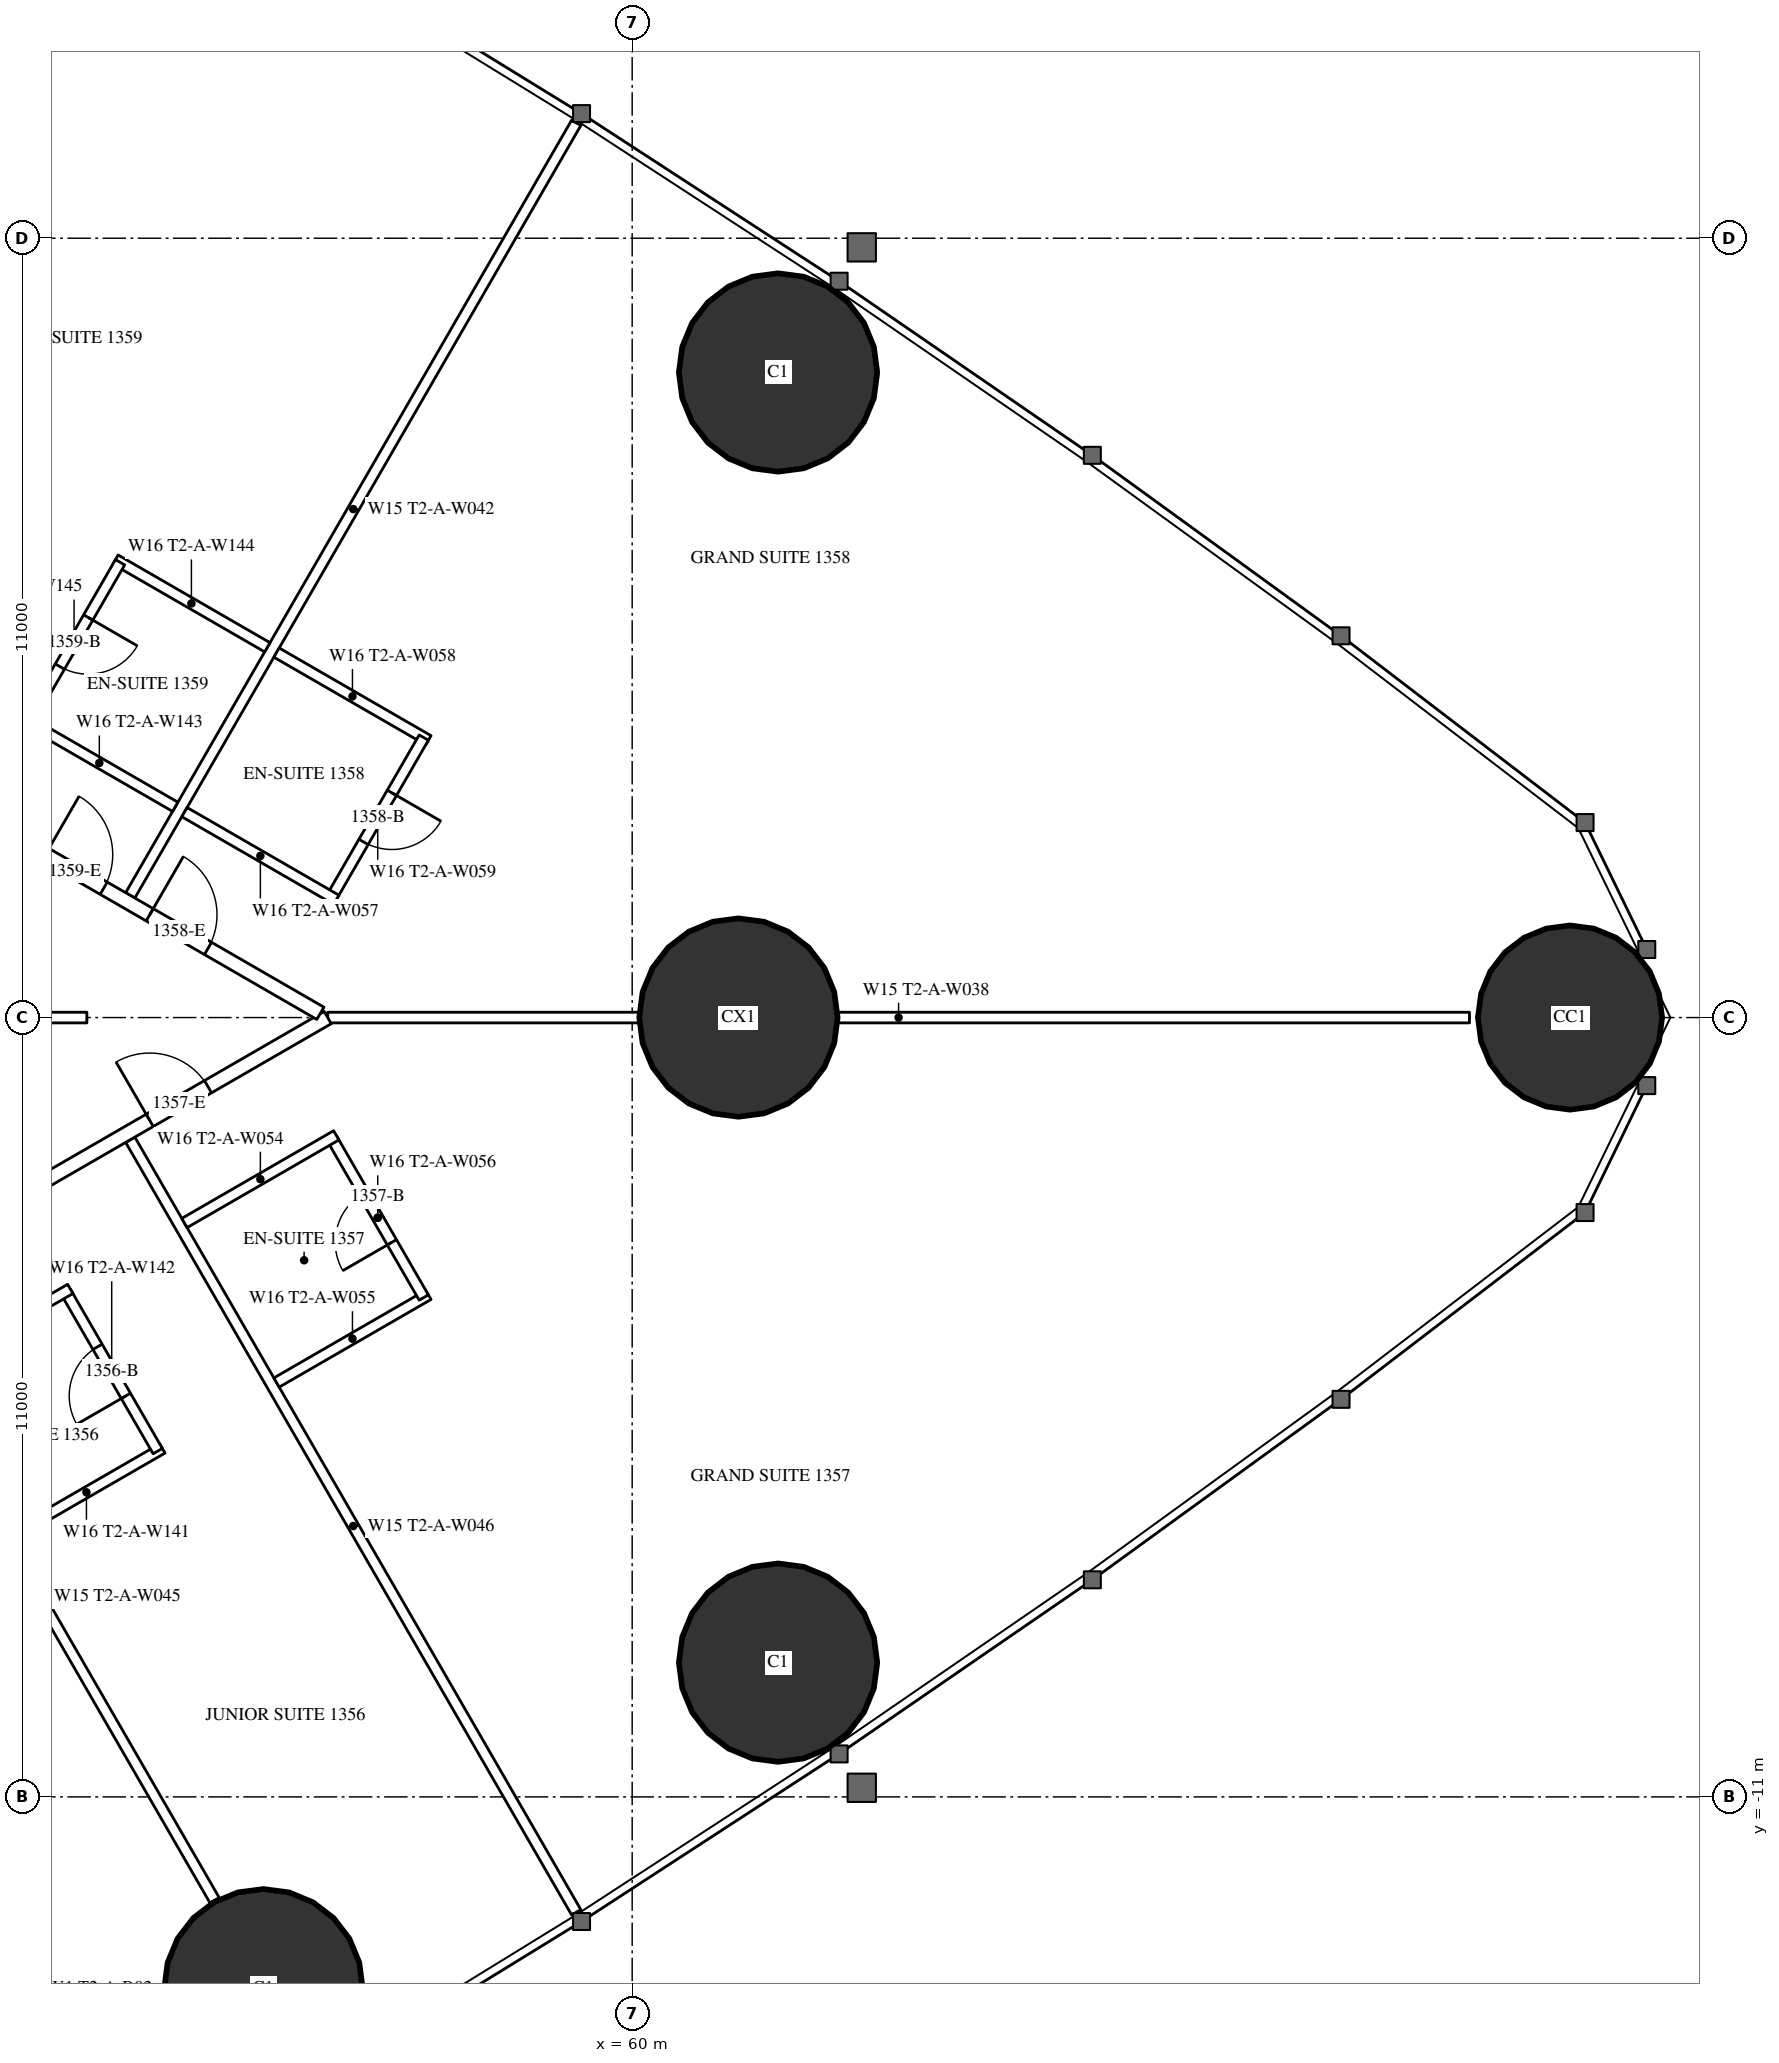
"""IFC4 building model, lengths in metres.
Left out: names, types, materials, properties, quantities, classifications, styles, units other than length and angle.
Written with IfcOpenShell. Run it as: python <this file> out.ifc"""

import sys

from ifc_helpers import new_model, si_unit, direction, frame, frame_2d, origin, origin_2d, place, context, subcontext, project, spatial, rectangle, hollow_circle, extrude, element, fill, save


model = new_model("IFC4")
c1 = context("Model", 3, precision=1e-05, world=origin(), true_north=direction((0.0, 1.0)))
c2 = subcontext(c1, "Body", "Model", "MODEL_VIEW")
j1 = project(units=[si_unit("LENGTHUNIT", "METRE"), si_unit("PLANEANGLEUNIT", "RADIAN")], contexts=[c1])
p1 = place(None, origin())
s1 = spatial("IfcSite", under=j1, at=p1, CompositionType="ELEMENT")
p2 = place(p1, origin())
s2 = spatial("IfcBuilding", under=s1, at=p2, CompositionType="ELEMENT")
p3 = place(p2, frame((0.0, 0.0, 53.0)))
s3 = spatial("IfcBuildingStorey", under=s2, at=p3, CompositionType="ELEMENT", Elevation=53.0)
p4 = place(p3, frame((73.239, 0.0, 0.0), z_axis=(0.0, 0.0, 1.0), x_axis=(1.0, 0.0, 0.0)))
e1 = element("IfcColumn", 1, at=p4, inside=s3, PredefinedType="COLUMN", context=c2, shape_type="SweptSolid", body=[
    extrude(hollow_circle(Radius=1.3, WallThickness=0.1, at=origin_2d()), origin(), (0.0, 0.0, 1.0), 3.5),
])
for number, where, z_axis, x_axis in (
    (2, (62.059, 9.105, 0.0), (0.0, 0.0, 1.0), (1.0, 0.0, 0.0)),
    (3, (54.795, -13.701, 0.0), (0.0, 0.0, 1.0), (1.0, 0.0, 0.0)),
    (4, (62.059, -9.105, 0.0), (0.0, 0.0, 1.0), (1.0, 0.0, 0.0)),
):
    element("IfcColumn", number, at=place(p3, frame(where, z_axis=z_axis, x_axis=x_axis)), inside=s3, PredefinedType="COLUMN", context=c2, shape_type="SweptSolid", body=[
        extrude(hollow_circle(Radius=1.4, WallThickness=0.12, at=origin_2d()), origin(), (0.0, 0.0, 1.0), 3.5),
    ])
p5 = place(p3, frame((61.5, 0.0, 0.0), z_axis=(0.0, 0.0, 1.0), x_axis=(1.0, 0.0, 0.0)))
e5 = element("IfcColumn", 5, at=p5, inside=s3, PredefinedType="COLUMN", context=c2, shape_type="SweptSolid", body=[
    extrude(hollow_circle(Radius=1.4, WallThickness=0.1, at=origin_2d()), origin(), (0.0, 0.0, 1.0), 3.5),
])
p6 = place(p3, frame((45.403, -6.062, 0.0), z_axis=(0.0, 0.0, 1.0), x_axis=(0.500007077968, -0.866021317279, 0.0)))
e6 = element("IfcWall", 6, at=p6, inside=s3, PredefinedType="PARTITIONING", context=c2, shape_type="SweptSolid", body=[
    extrude(rectangle(XDim=12.721, YDim=0.15, at=frame_2d((6.361, 0.0))), origin(), (0.0, 0.0, 1.0), 3.25),
])
p7 = place(p3, frame((49.159, -3.893, 0.0), z_axis=(0.0, 0.0, 1.0), x_axis=(0.499998773722, -0.866026111775, 0.0)))
e7 = element("IfcWall", 7, at=p7, inside=s3, PredefinedType="PARTITIONING", context=c2, shape_type="SweptSolid", body=[
    extrude(rectangle(XDim=9.892, YDim=0.15, at=frame_2d((4.946, 0.0))), origin(), (0.0, 0.0, 1.0), 2.25),
])
for number, where, z_axis, x_axis in (
    (8, (52.915, -1.725, 0.0), (0.0, 0.0, 1.0), (0.5, -0.866, 0.0)),
    (9, (52.915, 1.725, 0.0), (0.0, 0.0, 1.0), (0.5, 0.866, 0.0)),
):
    element("IfcWall", number, at=place(p3, frame(where, z_axis=z_axis, x_axis=x_axis)), inside=s3, PredefinedType="PARTITIONING", context=c2, shape_type="SweptSolid", body=[
        extrude(rectangle(XDim=12.591, YDim=0.15, at=frame_2d((6.295, 0.0))), origin(), (0.0, 0.0, 1.0), 3.25),
    ])
p8 = place(p3, frame((55.702, 0.0, 0.0), z_axis=(0.0, 0.0, 1.0), x_axis=(1.0, 0.0, 0.0)))
e10 = element("IfcWall", 10, at=p8, inside=s3, PredefinedType="PARTITIONING", context=c2, shape_type="SweptSolid", body=[
    extrude(rectangle(XDim=16.117, YDim=0.15, at=frame_2d((8.059, 0.0))), origin(), (0.0, 0.0, 1.0), 2.25),
])
p9 = place(p3, frame((37.96, -10.243, 0.0), z_axis=(0.0, 0.0, 1.0), x_axis=(0.866026429433, 0.499998223521, 0.0)))
e11 = element("IfcWall", 11, at=p9, inside=s3, PredefinedType="PARTITIONING", context=c2, shape_type="SweptSolid", body=[
    extrude(rectangle(XDim=20.487, YDim=0.2, at=frame_2d((10.243, 0.0))), origin(), (0.0, 0.0, 1.0), 3.25),
])
p10 = place(p9, frame((6.925, 0.0, 0.0)))
e12 = element("IfcOpeningElement", 12, at=p10, cuts=e11, PredefinedType="OPENING", context=c2, shape_type="SweptSolid", body=[
    extrude(rectangle(XDim=0.95, YDim=2.2, at=frame_2d((0.475, 1.1))), frame((0.0, 0.11, 0.0), z_axis=(0.0, -1.0, 0.0), x_axis=(1.0, 0.0, 0.0)), (0.0, 0.0, 1.0), 0.22),
])
p11 = place(p9, frame((11.549, 0.0, 0.0)))
e13 = element("IfcOpeningElement", 13, at=p11, cuts=e11, PredefinedType="OPENING", context=c2, shape_type="SweptSolid", body=[
    extrude(rectangle(XDim=0.95, YDim=2.2, at=frame_2d((0.475, 1.1))), frame((0.0, 0.11, 0.0), z_axis=(0.0, -1.0, 0.0), x_axis=(1.0, 0.0, 0.0)), (0.0, 0.0, 1.0), 0.22),
])
p12 = place(p9, frame((13.249, 0.0, 0.0)))
e14 = element("IfcOpeningElement", 14, at=p12, cuts=e11, PredefinedType="OPENING", context=c2, shape_type="SweptSolid", body=[
    extrude(rectangle(XDim=0.95, YDim=2.2, at=frame_2d((0.475, 1.1))), frame((0.0, 0.11, 0.0), z_axis=(0.0, -1.0, 0.0), x_axis=(1.0, 0.0, 0.0)), (0.0, 0.0, 1.0), 0.22),
])
p13 = place(p9, frame((17.585, 0.0, 0.0)))
e15 = element("IfcOpeningElement", 15, at=p13, cuts=e11, PredefinedType="OPENING", context=c2, shape_type="SweptSolid", body=[
    extrude(rectangle(XDim=0.95, YDim=2.2, at=frame_2d((0.475, 1.1))), frame((0.0, 0.11, 0.0), z_axis=(0.0, -1.0, 0.0), x_axis=(1.0, 0.0, 0.0)), (0.0, 0.0, 1.0), 0.22),
])
p14 = place(p9, frame((0.6, 0.0, 0.0)))
e16 = element("IfcOpeningElement", 16, at=p14, cuts=e11, PredefinedType="OPENING", context=c2, shape_type="SweptSolid", body=[
    extrude(rectangle(XDim=0.95, YDim=2.2, at=frame_2d((0.475, 1.1))), frame((0.0, 0.11, 0.0), z_axis=(0.0, -1.0, 0.0), x_axis=(1.0, 0.0, 0.0)), (0.0, 0.0, 1.0), 0.22),
])
p15 = place(p3, frame((45.375, 5.963, 0.0), z_axis=(0.0, 0.0, 1.0), x_axis=(0.86603164725, -0.499989185844, 0.0)))
e17 = element("IfcWall", 17, at=p15, inside=s3, PredefinedType="PARTITIONING", context=c2, shape_type="SweptSolid", body=[
    extrude(rectangle(XDim=11.805, YDim=0.2, at=frame_2d((5.903, 0.0))), origin(), (0.0, 0.0, 1.0), 3.25),
])
p16 = place(p15, frame((9.024, 0.0, 0.0)))
e18 = element("IfcOpeningElement", 18, at=p16, cuts=e17, PredefinedType="OPENING", context=c2, shape_type="SweptSolid", body=[
    extrude(rectangle(XDim=0.95, YDim=2.2, at=frame_2d((0.475, 1.1))), frame((0.0, 0.11, 0.0), z_axis=(0.0, -1.0, 0.0), x_axis=(1.0, 0.0, 0.0)), (0.0, 0.0, 1.0), 0.22),
])
p17 = place(p15, frame((7.324, 0.0, 0.0)))
e19 = element("IfcOpeningElement", 19, at=p17, cuts=e17, PredefinedType="OPENING", context=c2, shape_type="SweptSolid", body=[
    extrude(rectangle(XDim=0.95, YDim=2.2, at=frame_2d((0.475, 1.1))), frame((0.0, 0.11, 0.0), z_axis=(0.0, -1.0, 0.0), x_axis=(1.0, 0.0, 0.0)), (0.0, 0.0, 1.0), 0.22),
])
p18 = place(p3, frame((51.224, -7.32, 0.0), z_axis=(0.0, 0.0, 1.0), x_axis=(0.866031185235, 0.4999899861, 0.0)))
e20 = element("IfcWall", 20, at=p18, inside=s3, PredefinedType="PARTITIONING", context=c2, shape_type="SweptSolid", body=[
    extrude(rectangle(XDim=2.475, YDim=0.15, at=frame_2d((1.238, 0.0))), origin(), (0.0, 0.0, 1.0), 3.25),
])
p19 = place(p3, frame((52.003, -3.868, 0.0), z_axis=(0.0, 0.0, 1.0), x_axis=(0.500047596559, -0.865997922154, 0.0)))
e21 = element("IfcWall", 21, at=p19, inside=s3, PredefinedType="PARTITIONING", context=c2, shape_type="SweptSolid", body=[
    extrude(rectangle(XDim=2.6, YDim=0.15, at=frame_2d((1.3, 0.0))), origin(), (0.0, 0.0, 1.0), 3.25),
])
p20 = place(p19, frame((0.9, 0.0, 0.0)))
e22 = element("IfcOpeningElement", 22, at=p20, cuts=e21, PredefinedType="OPENING", context=c2, shape_type="SweptSolid", body=[
    extrude(rectangle(XDim=0.8, YDim=2.2, at=frame_2d((0.4, 1.1))), frame((0.0, 0.085, 0.0), z_axis=(0.0, -1.0, 0.0), x_axis=(1.0, 0.0, 0.0)), (0.0, 0.0, 1.0), 0.17),
])
for number, where, z_axis, x_axis in (
    (23, (49.925, -5.068, 0.0), (0.0, 0.0, 1.0), (0.866, 0.5, 0.0)),
    (24, (54.98, -5.151, 0.0), (0.0, 0.0, 1.0), (0.866, 0.5, 0.0)),
):
    element("IfcWall", number, at=place(p3, frame(where, z_axis=z_axis, x_axis=x_axis)), inside=s3, PredefinedType="PARTITIONING", context=c2, shape_type="SweptSolid", body=[
        extrude(rectangle(XDim=2.475, YDim=0.15, at=frame_2d((1.237, 0.0))), origin(), (0.0, 0.0, 1.0), 3.25),
    ])
p21 = place(p3, frame((55.758, -1.7, 0.0), z_axis=(0.0, 0.0, 1.0), x_axis=(0.500006934395, -0.866021400173, 0.0)))
e25 = element("IfcWall", 25, at=p21, inside=s3, PredefinedType="PARTITIONING", context=c2, shape_type="SweptSolid", body=[
    extrude(rectangle(XDim=2.6, YDim=0.15, at=frame_2d((1.3, 0.0))), origin(), (0.0, 0.0, 1.0), 3.25),
])
p22 = place(p21, frame((0.9, 0.0, 0.0)))
e26 = element("IfcOpeningElement", 26, at=p22, cuts=e25, PredefinedType="OPENING", context=c2, shape_type="SweptSolid", body=[
    extrude(rectangle(XDim=0.8, YDim=2.2, at=frame_2d((0.4, 1.1))), frame((0.0, 0.085, 0.0), z_axis=(0.0, -1.0, 0.0), x_axis=(1.0, 0.0, 0.0)), (0.0, 0.0, 1.0), 0.17),
])
for number, where, z_axis, x_axis in (
    (27, (53.68, -2.9, 0.0), (0.0, 0.0, 1.0), (0.866, 0.5, 0.0)),
    (28, (54.98, 5.151, 0.0), (0.0, 0.0, 1.0), (0.866, -0.5, 0.0)),
):
    element("IfcWall", number, at=place(p3, frame(where, z_axis=z_axis, x_axis=x_axis)), inside=s3, PredefinedType="PARTITIONING", context=c2, shape_type="SweptSolid", body=[
        extrude(rectangle(XDim=2.475, YDim=0.15, at=frame_2d((1.237, 0.0))), origin(), (0.0, 0.0, 1.0), 3.25),
    ])
p23 = place(p3, frame((55.758, 1.7, 0.0), z_axis=(0.0, 0.0, 1.0), x_axis=(0.500006934395, 0.866021400173, 0.0)))
e29 = element("IfcWall", 29, at=p23, inside=s3, PredefinedType="PARTITIONING", context=c2, shape_type="SweptSolid", body=[
    extrude(rectangle(XDim=2.6, YDim=0.15, at=frame_2d((1.3, 0.0))), origin(), (0.0, 0.0, 1.0), 3.25),
])
p24 = place(p23, frame((0.9, 0.0, 0.0)))
e30 = element("IfcOpeningElement", 30, at=p24, cuts=e29, PredefinedType="OPENING", context=c2, shape_type="SweptSolid", body=[
    extrude(rectangle(XDim=0.8, YDim=2.2, at=frame_2d((0.4, 1.1))), frame((0.0, 0.085, 0.0), z_axis=(0.0, -1.0, 0.0), x_axis=(1.0, 0.0, 0.0)), (0.0, 0.0, 1.0), 0.17),
])
for number, where, z_axis, x_axis in (
    (31, (53.68, 2.9, 0.0), (0.0, 0.0, 1.0), (0.866, -0.5, 0.0)),
    (32, (52.706, 6.464, 0.0), (0.0, 0.0, 1.0), (0.866, -0.5, 0.0)),
):
    element("IfcWall", number, at=place(p3, frame(where, z_axis=z_axis, x_axis=x_axis)), inside=s3, PredefinedType="PARTITIONING", context=c2, shape_type="SweptSolid", body=[
        extrude(rectangle(XDim=2.475, YDim=0.15, at=frame_2d((1.237, 0.0))), origin(), (0.0, 0.0, 1.0), 3.25),
    ])
p25 = place(p3, frame((51.471, 4.175, 0.0), z_axis=(0.0, 0.0, 1.0), x_axis=(0.500006934395, 0.866021400173, 0.0)))
e33 = element("IfcWall", 33, at=p25, inside=s3, PredefinedType="PARTITIONING", context=c2, shape_type="SweptSolid", body=[
    extrude(rectangle(XDim=2.6, YDim=0.15, at=frame_2d((1.3, 0.0))), origin(), (0.0, 0.0, 1.0), 3.25),
])
p26 = place(p25, frame((0.9, 0.0, 0.0)))
e34 = element("IfcOpeningElement", 34, at=p26, cuts=e33, PredefinedType="OPENING", context=c2, shape_type="SweptSolid", body=[
    extrude(rectangle(XDim=0.8, YDim=2.2, at=frame_2d((0.4, 1.1))), frame((0.0, 0.085, 0.0), z_axis=(0.0, -1.0, 0.0), x_axis=(1.0, 0.0, 0.0)), (0.0, 0.0, 1.0), 0.17),
])
p27 = place(p3, frame((51.406, 4.212, 0.0), z_axis=(0.0, 0.0, 1.0), x_axis=(0.866031185235, -0.4999899861, 0.0)))
e35 = element("IfcWall", 35, at=p27, inside=s3, PredefinedType="PARTITIONING", context=c2, shape_type="SweptSolid", body=[
    extrude(rectangle(XDim=2.475, YDim=0.15, at=frame_2d((1.238, 0.0))), origin(), (0.0, 0.0, 1.0), 3.25),
])
p28 = place(p3, frame((44.575, 0.0, 0.0), z_axis=(0.0, 0.0, 1.0), x_axis=(1.0, 0.0, 0.0)))
e36 = element("IfcWall", 36, at=p28, inside=s3, PredefinedType="PARTITIONING", context=c2, shape_type="SweptSolid", body=[
    extrude(rectangle(XDim=7.727, YDim=0.15, at=frame_2d((3.864, 0.0))), origin(), (0.0, 0.0, 1.0), 2.25),
])
p29 = place(p20, origin())
e37 = element("IfcDoor", 37, at=p29, inside=s3, OperationType="SINGLE_SWING_RIGHT", PredefinedType="DOOR", context=c2, shape_type="SweptSolid", body=[
    extrude(rectangle(XDim=0.8, YDim=2.2, at=frame_2d((0.4, 1.1))), frame((0.0, 0.025, 0.0), z_axis=(0.0, -1.0, 0.0), x_axis=(1.0, 0.0, 0.0)), (0.0, 0.0, 1.0), 0.05),
])
fill(e22, e37)
p30 = place(p22, origin())
e38 = element("IfcDoor", 38, at=p30, inside=s3, OperationType="SINGLE_SWING_RIGHT", PredefinedType="DOOR", context=c2, shape_type="SweptSolid", body=[
    extrude(rectangle(XDim=0.8, YDim=2.2, at=frame_2d((0.4, 1.1))), frame((0.0, 0.025, 0.0), z_axis=(0.0, -1.0, 0.0), x_axis=(1.0, 0.0, 0.0)), (0.0, 0.0, 1.0), 0.05),
])
fill(e26, e38)
p31 = place(p13, origin())
e39 = element("IfcDoor", 39, at=p31, inside=s3, OperationType="SINGLE_SWING_LEFT", PredefinedType="DOOR", context=c2, shape_type="SweptSolid", body=[
    extrude(rectangle(XDim=0.95, YDim=2.2, at=frame_2d((0.475, 1.1))), frame((0.0, 0.025, 0.0), z_axis=(0.0, -1.0, 0.0), x_axis=(1.0, 0.0, 0.0)), (0.0, 0.0, 1.0), 0.05),
])
fill(e15, e39)
p32 = place(p24, origin())
e40 = element("IfcDoor", 40, at=p32, inside=s3, OperationType="SINGLE_SWING_RIGHT", PredefinedType="DOOR", context=c2, shape_type="SweptSolid", body=[
    extrude(rectangle(XDim=0.8, YDim=2.2, at=frame_2d((0.4, 1.1))), frame((0.0, 0.025, 0.0), z_axis=(0.0, -1.0, 0.0), x_axis=(1.0, 0.0, 0.0)), (0.0, 0.0, 1.0), 0.05),
])
fill(e30, e40)
p33 = place(p16, origin())
e41 = element("IfcDoor", 41, at=p33, inside=s3, OperationType="SINGLE_SWING_LEFT", PredefinedType="DOOR", context=c2, shape_type="SweptSolid", body=[
    extrude(rectangle(XDim=0.95, YDim=2.2, at=frame_2d((0.475, 1.1))), frame((0.0, 0.025, 0.0), z_axis=(0.0, -1.0, 0.0), x_axis=(1.0, 0.0, 0.0)), (0.0, 0.0, 1.0), 0.05),
])
fill(e18, e41)
p34 = place(p26, origin())
e42 = element("IfcDoor", 42, at=p34, inside=s3, OperationType="SINGLE_SWING_RIGHT", PredefinedType="DOOR", context=c2, shape_type="SweptSolid", body=[
    extrude(rectangle(XDim=0.8, YDim=2.2, at=frame_2d((0.4, 1.1))), frame((0.0, 0.025, 0.0), z_axis=(0.0, -1.0, 0.0), x_axis=(1.0, 0.0, 0.0)), (0.0, 0.0, 1.0), 0.05),
])
fill(e34, e42)
p35 = place(p17, origin())
e43 = element("IfcDoor", 43, at=p35, inside=s3, OperationType="SINGLE_SWING_LEFT", PredefinedType="DOOR", context=c2, shape_type="SweptSolid", body=[
    extrude(rectangle(XDim=0.95, YDim=2.2, at=frame_2d((0.475, 1.1))), frame((0.0, 0.025, 0.0), z_axis=(0.0, -1.0, 0.0), x_axis=(1.0, 0.0, 0.0)), (0.0, 0.0, 1.0), 0.05),
])
fill(e19, e43)
save(model, sys.argv[1])
